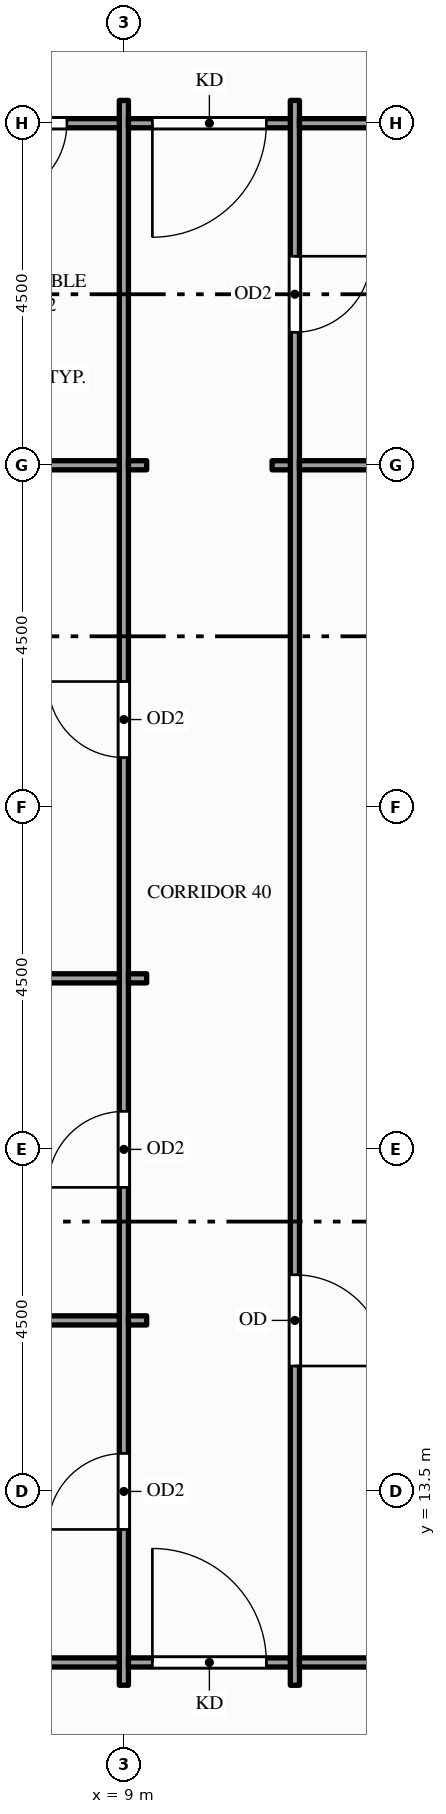
"""IFC4 building model, lengths in metres.
Left out: names, types, materials, properties, quantities, classifications, styles, units other than length and angle.
Written with IfcOpenShell. Run it as: python <this file> out.ifc"""

import sys

from ifc_helpers import new_model, si_unit, direction, frame, frame_2d, origin, place, context, subcontext, project, spatial, rectangle, extrude, element, fill, save


model = new_model("IFC4")
c1 = context("Model", 3, precision=1e-05, world=origin(), true_north=direction((0.0, 1.0)))
c2 = subcontext(c1, "Body", "Model", "MODEL_VIEW")
j1 = project(units=[si_unit("LENGTHUNIT", "METRE"), si_unit("PLANEANGLEUNIT", "RADIAN")], contexts=[c1])
p1 = place(None, origin())
s1 = spatial("IfcSite", under=j1, at=p1, CompositionType="ELEMENT")
p2 = place(p1, origin())
s2 = spatial("IfcBuilding", under=s1, at=p2, CompositionType="ELEMENT")
p3 = place(p2, frame((0.0, 0.0, 195.0)))
s3 = spatial("IfcBuildingStorey", under=s2, at=p3, CompositionType="ELEMENT", Elevation=195.0)
p4 = place(p3, frame((9.0, 10.95, 0.0), z_axis=(0.0, 0.0, 1.0), x_axis=(0.0, 1.0, 0.0)))
e1 = element("IfcWall", 1, at=p4, inside=s3, PredefinedType="PARTITIONING", context=c2, shape_type="SweptSolid", body=[
    extrude(rectangle(XDim=20.85, YDim=0.12, at=frame_2d((10.425, 0.0))), origin(), (0.0, 0.0, 1.0), 2.6),
])
p5 = place(p4, frame((2.05, 0.0, 0.0)))
e2 = element("IfcOpeningElement", 2, at=p5, cuts=e1, PredefinedType="OPENING", context=c2, shape_type="SweptSolid", body=[
    extrude(rectangle(XDim=1.0, YDim=2.1, at=frame_2d((0.5, 1.05))), frame((0.0, 0.07, 0.0), z_axis=(0.0, -1.0, 0.0), x_axis=(1.0, 0.0, 0.0)), (0.0, 0.0, 1.0), 0.14),
])
p6 = place(p4, frame((6.55, 0.0, 0.0)))
e3 = element("IfcOpeningElement", 3, at=p6, cuts=e1, PredefinedType="OPENING", context=c2, shape_type="SweptSolid", body=[
    extrude(rectangle(XDim=1.0, YDim=2.1, at=frame_2d((0.5, 1.05))), frame((0.0, 0.07, 0.0), z_axis=(0.0, -1.0, 0.0), x_axis=(1.0, 0.0, 0.0)), (0.0, 0.0, 1.0), 0.14),
])
p7 = place(p4, frame((12.205, 0.0, 0.0)))
e4 = element("IfcOpeningElement", 4, at=p7, cuts=e1, PredefinedType="OPENING", context=c2, shape_type="SweptSolid", body=[
    extrude(rectangle(XDim=1.0, YDim=2.1, at=frame_2d((0.5, 1.05))), frame((0.0, 0.07, 0.0), z_axis=(0.0, -1.0, 0.0), x_axis=(1.0, 0.0, 0.0)), (0.0, 0.0, 1.0), 0.14),
])
p8 = place(p3, frame((11.25, 10.95, 0.0), z_axis=(0.0, 0.0, 1.0), x_axis=(0.0, 1.0, 0.0)))
e5 = element("IfcWall", 5, at=p8, inside=s3, PredefinedType="PARTITIONING", context=c2, shape_type="SweptSolid", body=[
    extrude(rectangle(XDim=20.85, YDim=0.12, at=frame_2d((10.425, 0.0))), origin(), (0.0, 0.0, 1.0), 2.6),
])
p9 = place(p8, frame((17.8, 0.0, 0.0)))
e6 = element("IfcOpeningElement", 6, at=p9, cuts=e5, PredefinedType="OPENING", context=c2, shape_type="SweptSolid", body=[
    extrude(rectangle(XDim=1.0, YDim=2.1, at=frame_2d((0.5, 1.05))), frame((0.0, 0.07, 0.0), z_axis=(0.0, -1.0, 0.0), x_axis=(1.0, 0.0, 0.0)), (0.0, 0.0, 1.0), 0.14),
])
p10 = place(p8, frame((4.2, 0.0, 0.0)))
e7 = element("IfcOpeningElement", 7, at=p10, cuts=e5, PredefinedType="OPENING", context=c2, shape_type="SweptSolid", body=[
    extrude(rectangle(XDim=1.2, YDim=2.1, at=frame_2d((0.6, 1.05))), frame((0.0, 0.07, 0.0), z_axis=(0.0, -1.0, 0.0), x_axis=(1.0, 0.0, 0.0)), (0.0, 0.0, 1.0), 0.14),
])
p11 = place(p3, frame((0.15, 11.25, 0.0), z_axis=(0.0, 0.0, 1.0), x_axis=(1.0, 0.0, 0.0)))
e8 = element("IfcWall", 8, at=p11, inside=s3, PredefinedType="PARTITIONING", context=c2, shape_type="SweptSolid", body=[
    extrude(rectangle(XDim=8.79, YDim=0.12, at=frame_2d((4.395, 0.0))), origin(), (0.0, 0.0, 1.0), 2.87),
])
p12 = place(p3, frame((9.06, 11.25, 0.0), z_axis=(0.0, 0.0, 1.0), x_axis=(1.0, 0.0, 0.0)))
e9 = element("IfcWall", 9, at=p12, inside=s3, PredefinedType="PARTITIONING", context=c2, shape_type="SweptSolid", body=[
    extrude(rectangle(XDim=2.13, YDim=0.12, at=frame_2d((1.065, 0.0))), origin(), (0.0, 0.0, 1.0), 2.87),
])
p13 = place(p12, frame((0.315, 0.0, 0.0)))
e10 = element("IfcOpeningElement", 10, at=p13, cuts=e9, PredefinedType="OPENING", context=c2, shape_type="SweptSolid", body=[
    extrude(rectangle(XDim=1.5, YDim=2.1, at=frame_2d((0.75, 1.05))), frame((0.0, 0.07, 0.0), z_axis=(0.0, -1.0, 0.0), x_axis=(1.0, 0.0, 0.0)), (0.0, 0.0, 1.0), 0.14),
])
p14 = place(p3, frame((11.31, 11.25, 0.0), z_axis=(0.0, 0.0, 1.0), x_axis=(1.0, 0.0, 0.0)))
e11 = element("IfcWall", 11, at=p14, inside=s3, PredefinedType="PARTITIONING", context=c2, shape_type="SweptSolid", body=[
    extrude(rectangle(XDim=13.38, YDim=0.12, at=frame_2d((6.69, 0.0))), origin(), (0.0, 0.0, 1.0), 2.76),
])
p15 = place(p14, frame((3.54, 0.0, 0.0)))
e12 = element("IfcOpeningElement", 12, at=p15, cuts=e11, PredefinedType="OPENING", context=c2, shape_type="SweptSolid", body=[
    extrude(rectangle(XDim=1.8, YDim=2.1, at=frame_2d((0.9, 1.05))), frame((0.0, 0.07, 0.0), z_axis=(0.0, -1.0, 0.0), x_axis=(1.0, 0.0, 0.0)), (0.0, 0.0, 1.0), 0.14),
])
p16 = place(p3, frame((0.15, 15.75, 0.0), z_axis=(0.0, 0.0, 1.0), x_axis=(1.0, 0.0, 0.0)))
e13 = element("IfcWall", 13, at=p16, inside=s3, PredefinedType="PARTITIONING", context=c2, shape_type="SweptSolid", body=[
    extrude(rectangle(XDim=8.79, YDim=0.12, at=frame_2d((4.395, 0.0))), origin(), (0.0, 0.0, 1.0), 2.87),
])
p17 = place(p3, frame((9.06, 15.75, 0.0), z_axis=(0.0, 0.0, 1.0), x_axis=(1.0, 0.0, 0.0)))
e14 = element("IfcWall", 14, at=p17, inside=s3, PredefinedType="PARTITIONING", context=c2, shape_type="SweptSolid", body=[
    extrude(rectangle(XDim=0.24, YDim=0.12, at=frame_2d((0.12, 0.0))), origin(), (0.0, 0.0, 1.0), 2.87),
])
p18 = place(p3, frame((0.15, 20.25, 0.0), z_axis=(0.0, 0.0, 1.0), x_axis=(1.0, 0.0, 0.0)))
e15 = element("IfcWall", 15, at=p18, inside=s3, PredefinedType="PARTITIONING", context=c2, shape_type="SweptSolid", body=[
    extrude(rectangle(XDim=8.79, YDim=0.12, at=frame_2d((4.395, 0.0))), origin(), (0.0, 0.0, 1.0), 2.87),
])
p19 = place(p3, frame((9.06, 20.25, 0.0), z_axis=(0.0, 0.0, 1.0), x_axis=(1.0, 0.0, 0.0)))
e16 = element("IfcWall", 16, at=p19, inside=s3, PredefinedType="PARTITIONING", context=c2, shape_type="SweptSolid", body=[
    extrude(rectangle(XDim=0.24, YDim=0.12, at=frame_2d((0.12, 0.0))), origin(), (0.0, 0.0, 1.0), 2.87),
])
p20 = place(p3, frame((6.56, 27.0, 0.0), z_axis=(0.0, 0.0, 1.0), x_axis=(1.0, 0.0, 0.0)))
e17 = element("IfcWall", 17, at=p20, inside=s3, PredefinedType="PARTITIONING", context=c2, shape_type="SweptSolid", body=[
    extrude(rectangle(XDim=2.38, YDim=0.12, at=frame_2d((1.19, 0.0))), origin(), (0.0, 0.0, 1.0), 2.87),
])
for number, where, z_axis, x_axis in (
    (18, (9.06, 27.0, 0.0), (0.0, 0.0, 1.0), (1.0, 0.0, 0.0)),
    (19, (10.95, 27.0, 0.0), (0.0, 0.0, 1.0), (1.0, 0.0, 0.0)),
):
    element("IfcWall", number, at=place(p3, frame(where, z_axis=z_axis, x_axis=x_axis)), inside=s3, PredefinedType="PARTITIONING", context=c2, shape_type="SweptSolid", body=[
        extrude(rectangle(XDim=0.24, YDim=0.12, at=frame_2d((0.12, 0.0))), origin(), (0.0, 0.0, 1.0), 2.87),
    ])
p21 = place(p3, frame((11.31, 27.0, 0.0), z_axis=(0.0, 0.0, 1.0), x_axis=(1.0, 0.0, 0.0)))
e20 = element("IfcWall", 20, at=p21, inside=s3, PredefinedType="PARTITIONING", context=c2, shape_type="SweptSolid", body=[
    extrude(rectangle(XDim=12.54, YDim=0.12, at=frame_2d((6.27, 0.0))), origin(), (0.0, 0.0, 1.0), 2.87),
])
p22 = place(p3, frame((6.56, 31.5, 0.0), z_axis=(0.0, 0.0, 1.0), x_axis=(1.0, 0.0, 0.0)))
e21 = element("IfcWall", 21, at=p22, inside=s3, PredefinedType="PARTITIONING", context=c2, shape_type="SweptSolid", body=[
    extrude(rectangle(XDim=2.38, YDim=0.12, at=frame_2d((1.19, 0.0))), origin(), (0.0, 0.0, 1.0), 2.87),
])
p23 = place(p22, frame((0.69, 0.0, 0.0)))
e22 = element("IfcOpeningElement", 22, at=p23, cuts=e21, PredefinedType="OPENING", context=c2, shape_type="SweptSolid", body=[
    extrude(rectangle(XDim=1.0, YDim=2.1, at=frame_2d((0.5, 1.05))), frame((0.0, 0.07, 0.0), z_axis=(0.0, -1.0, 0.0), x_axis=(1.0, 0.0, 0.0)), (0.0, 0.0, 1.0), 0.14),
])
p24 = place(p3, frame((9.06, 31.5, 0.0), z_axis=(0.0, 0.0, 1.0), x_axis=(1.0, 0.0, 0.0)))
e23 = element("IfcWall", 23, at=p24, inside=s3, PredefinedType="PARTITIONING", context=c2, shape_type="SweptSolid", body=[
    extrude(rectangle(XDim=2.13, YDim=0.12, at=frame_2d((1.065, 0.0))), origin(), (0.0, 0.0, 1.0), 2.87),
])
p25 = place(p24, frame((0.315, 0.0, 0.0)))
e24 = element("IfcOpeningElement", 24, at=p25, cuts=e23, PredefinedType="OPENING", context=c2, shape_type="SweptSolid", body=[
    extrude(rectangle(XDim=1.5, YDim=2.1, at=frame_2d((0.75, 1.05))), frame((0.0, 0.07, 0.0), z_axis=(0.0, -1.0, 0.0), x_axis=(1.0, 0.0, 0.0)), (0.0, 0.0, 1.0), 0.14),
])
p26 = place(p3, frame((11.31, 31.5, 0.0), z_axis=(0.0, 0.0, 1.0), x_axis=(1.0, 0.0, 0.0)))
e25 = element("IfcWall", 25, at=p26, inside=s3, PredefinedType="PARTITIONING", context=c2, shape_type="SweptSolid", body=[
    extrude(rectangle(XDim=12.54, YDim=0.12, at=frame_2d((6.27, 0.0))), origin(), (0.0, 0.0, 1.0), 2.87),
])
p27 = place(p13, origin())
e26 = element("IfcDoor", 26, at=p27, inside=s3, OperationType="SINGLE_SWING_LEFT", PredefinedType="DOOR", context=c2, shape_type="SweptSolid", body=[
    extrude(rectangle(XDim=1.5, YDim=2.1, at=frame_2d((0.75, 1.05))), frame((0.0, 0.025, 0.0), z_axis=(0.0, -1.0, 0.0), x_axis=(1.0, 0.0, 0.0)), (0.0, 0.0, 1.0), 0.05),
])
fill(e10, e26)
p28 = place(p25, origin())
e27 = element("IfcDoor", 27, at=p28, inside=s3, OperationType="SINGLE_SWING_LEFT", PredefinedType="DOOR", context=c2, shape_type="SweptSolid", body=[
    extrude(rectangle(XDim=1.5, YDim=2.1, at=frame_2d((0.75, 1.05))), frame((0.0, 0.025, 0.0), z_axis=(0.0, -1.0, 0.0), x_axis=(1.0, 0.0, 0.0)), (0.0, 0.0, 1.0), 0.05),
])
fill(e24, e27)
p29 = place(p5, origin())
e28 = element("IfcDoor", 28, at=p29, inside=s3, OperationType="SINGLE_SWING_LEFT", PredefinedType="DOOR", context=c2, shape_type="SweptSolid", body=[
    extrude(rectangle(XDim=1.0, YDim=2.1, at=frame_2d((0.5, 1.05))), frame((0.0, 0.025, 0.0), z_axis=(0.0, -1.0, 0.0), x_axis=(1.0, 0.0, 0.0)), (0.0, 0.0, 1.0), 0.05),
])
fill(e2, e28)
p30 = place(p6, origin())
e29 = element("IfcDoor", 29, at=p30, inside=s3, OperationType="SINGLE_SWING_LEFT", PredefinedType="DOOR", context=c2, shape_type="SweptSolid", body=[
    extrude(rectangle(XDim=1.0, YDim=2.1, at=frame_2d((0.5, 1.05))), frame((0.0, 0.025, 0.0), z_axis=(0.0, -1.0, 0.0), x_axis=(1.0, 0.0, 0.0)), (0.0, 0.0, 1.0), 0.05),
])
fill(e3, e29)
p31 = place(p7, origin())
e30 = element("IfcDoor", 30, at=p31, inside=s3, OperationType="SINGLE_SWING_RIGHT", PredefinedType="DOOR", context=c2, shape_type="SweptSolid", body=[
    extrude(rectangle(XDim=1.0, YDim=2.1, at=frame_2d((0.5, 1.05))), frame((0.0, 0.025, 0.0), z_axis=(0.0, -1.0, 0.0), x_axis=(1.0, 0.0, 0.0)), (0.0, 0.0, 1.0), 0.05),
])
fill(e4, e30)
p32 = place(p23, origin())
e31 = element("IfcDoor", 31, at=p32, inside=s3, OperationType="SINGLE_SWING_LEFT", PredefinedType="DOOR", context=c2, shape_type="SweptSolid", body=[
    extrude(rectangle(XDim=1.0, YDim=2.1, at=frame_2d((0.5, 1.05))), frame((0.0, 0.025, 0.0), z_axis=(0.0, -1.0, 0.0), x_axis=(1.0, 0.0, 0.0)), (0.0, 0.0, 1.0), 0.05),
])
fill(e22, e31)
p33 = place(p9, origin())
e32 = element("IfcDoor", 32, at=p33, inside=s3, OperationType="SINGLE_SWING_RIGHT", PredefinedType="DOOR", context=c2, shape_type="SweptSolid", body=[
    extrude(rectangle(XDim=1.0, YDim=2.1, at=frame_2d((0.5, 1.05))), frame((0.0, 0.025, 0.0), z_axis=(0.0, -1.0, 0.0), x_axis=(1.0, 0.0, 0.0)), (0.0, 0.0, 1.0), 0.05),
])
fill(e6, e32)
p34 = place(p10, origin())
e33 = element("IfcDoor", 33, at=p34, inside=s3, OperationType="SINGLE_SWING_LEFT", PredefinedType="DOOR", context=c2, shape_type="SweptSolid", body=[
    extrude(rectangle(XDim=1.2, YDim=2.1, at=frame_2d((0.6, 1.05))), frame((0.0, 0.025, 0.0), z_axis=(0.0, -1.0, 0.0), x_axis=(1.0, 0.0, 0.0)), (0.0, 0.0, 1.0), 0.05),
])
fill(e7, e33)
save(model, sys.argv[1])
